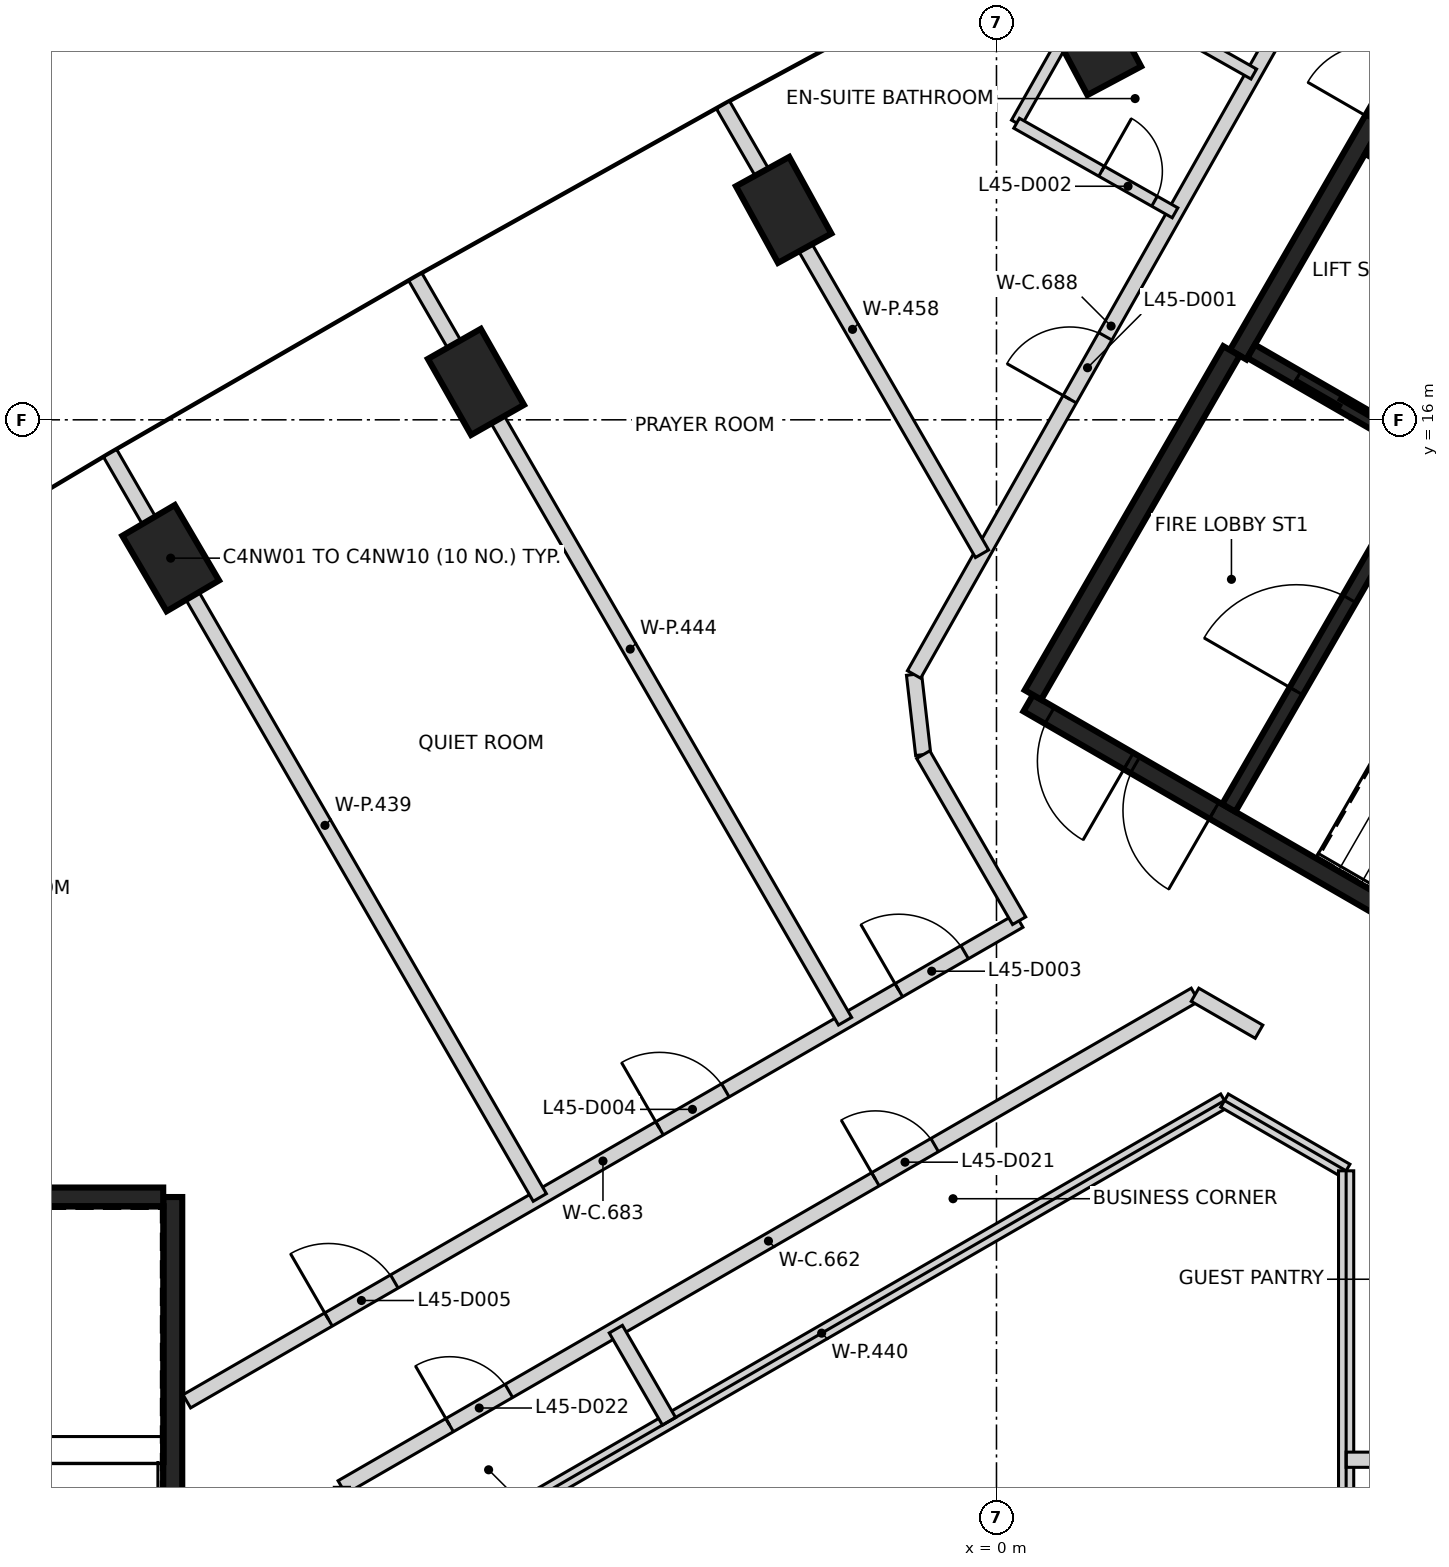
"""IFC4 building model, lengths in metres.
Left out: names, types, materials, properties, quantities, classifications, styles, units other than length and angle.
Written with IfcOpenShell. Run it as: python <this file> out.ifc"""

import sys

from ifc_helpers import new_model, si_unit, direction, frame, frame_2d, origin, origin_2d, place, context, subcontext, project, spatial, rectangle, extrude, element, fill, save


model = new_model("IFC4")
c1 = context("Model", 3, precision=1e-05, world=origin(), true_north=direction((0.0, 1.0)))
c2 = subcontext(c1, "Body", "Model", "MODEL_VIEW")
j1 = project(units=[si_unit("LENGTHUNIT", "METRE"), si_unit("PLANEANGLEUNIT", "RADIAN")], contexts=[c1])
p1 = place(None, origin())
s1 = spatial("IfcSite", under=j1, at=p1, CompositionType="ELEMENT")
p2 = place(p1, origin())
s2 = spatial("IfcBuilding", under=s1, at=p2, CompositionType="ELEMENT")
p3 = place(p2, frame((0.0, 0.0, 182.8)))
s3 = spatial("IfcBuildingStorey", under=s2, at=p3, CompositionType="ELEMENT", Elevation=182.8)
for number, where, z_axis, x_axis in (
    (1, (1.279, 20.968, -0.35), (0.0, 0.0, 1.0), (-0.47, 0.883, 0.0)),
    (2, (-2.8, 18.762, -0.35), (0.0, 0.0, 1.0), (-0.482, 0.876, 0.0)),
    (3, (-6.848, 16.499, -0.35), (0.0, 0.0, 1.0), (-0.494, 0.87, 0.0)),
    (4, (-10.864, 14.18, -0.35), (0.0, 0.0, 1.0), (-0.506, 0.862, 0.0)),
):
    element("IfcColumn", number, at=place(p3, frame(where, z_axis=z_axis, x_axis=x_axis)), inside=s3, PredefinedType="COLUMN", context=c2, shape_type="SweptSolid", body=[
        extrude(rectangle(XDim=1.15, YDim=0.8, at=origin_2d()), origin(), (0.0, 0.0, 1.0), 3.6),
    ])
p4 = place(p3, frame((-10.837, 5.775, 0.0), z_axis=(0.0, 0.0, 1.0), x_axis=(0.0, -1.0, 0.0)))
e5 = element("IfcWall", 5, at=p4, inside=s3, PredefinedType="SHEAR", context=c2, shape_type="SweptSolid", body=[
    extrude(rectangle(XDim=11.55, YDim=0.25, at=frame_2d((5.775, 0.0))), origin(), (0.0, 0.0, 1.0), 3.25),
])
p5 = place(p4, frame((10.025, 0.0, 0.0)))
e6 = element("IfcOpeningElement", 6, at=p5, cuts=e5, PredefinedType="OPENING", context=c2, shape_type="SweptSolid", body=[
    extrude(rectangle(XDim=1.2, YDim=2.1, at=frame_2d((0.6, 1.05))), frame((0.0, 0.135, 0.0), z_axis=(0.0, -1.0, 0.0), x_axis=(1.0, 0.0, 0.0)), (0.0, 0.0, 1.0), 0.27),
])
p6 = place(p4, frame((8.725, 0.0, 0.0)))
e7 = element("IfcOpeningElement", 7, at=p6, cuts=e5, PredefinedType="OPENING", context=c2, shape_type="SweptSolid", body=[
    extrude(rectangle(XDim=1.2, YDim=2.1, at=frame_2d((0.6, 1.05))), frame((0.0, 0.135, 0.0), z_axis=(0.0, -1.0, 0.0), x_axis=(1.0, 0.0, 0.0)), (0.0, 0.0, 1.0), 0.27),
])
p7 = place(p3, frame((-16.472, 5.775, 0.0), z_axis=(0.0, 0.0, 1.0), x_axis=(1.0, 0.0, 0.0)))
e8 = element("IfcWall", 8, at=p7, inside=s3, PredefinedType="SHEAR", context=c2, shape_type="SweptSolid", body=[
    extrude(rectangle(XDim=5.51, YDim=0.25, at=frame_2d((2.755, 0.0))), origin(), (0.0, 0.0, 1.0), 3.25),
])
p8 = place(p3, frame((10.42, 6.498, 0.0), z_axis=(0.0, 0.0, 1.0), x_axis=(-0.866021906294, 0.500006057782, 0.0)))
e9 = element("IfcWall", 9, at=p8, inside=s3, PredefinedType="SHEAR", context=c2, shape_type="SweptSolid", body=[
    extrude(rectangle(XDim=11.55, YDim=0.25, at=frame_2d((5.775, 0.0))), origin(), (0.0, 0.0, 1.0), 3.25),
])
p9 = place(p8, frame((10.025, 0.0, 0.0)))
e10 = element("IfcOpeningElement", 10, at=p9, cuts=e9, PredefinedType="OPENING", context=c2, shape_type="SweptSolid", body=[
    extrude(rectangle(XDim=1.2, YDim=2.1, at=frame_2d((0.6, 1.05))), frame((0.0, 0.135, 0.0), z_axis=(0.0, -1.0, 0.0), x_axis=(1.0, 0.0, 0.0)), (0.0, 0.0, 1.0), 0.27),
])
p10 = place(p8, frame((8.725, 0.0, 0.0)))
e11 = element("IfcOpeningElement", 11, at=p10, cuts=e9, PredefinedType="OPENING", context=c2, shape_type="SweptSolid", body=[
    extrude(rectangle(XDim=1.2, YDim=2.1, at=frame_2d((0.6, 1.05))), frame((0.0, 0.135, 0.0), z_axis=(0.0, -1.0, 0.0), x_axis=(1.0, 0.0, 0.0)), (0.0, 0.0, 1.0), 0.27),
])
p11 = place(p3, frame((3.179, 16.856, 0.0), z_axis=(0.0, 0.0, 1.0), x_axis=(0.500001955336, 0.866024274868, 0.0)))
e12 = element("IfcWall", 12, at=p11, inside=s3, PredefinedType="SHEAR", context=c2, shape_type="SweptSolid", body=[
    extrude(rectangle(XDim=6.125, YDim=0.25, at=frame_2d((3.062, 0.0))), origin(), (0.0, 0.0, 1.0), 3.25),
])
p12 = place(p11, frame((3.563, 0.0, 0.0)))
e13 = element("IfcOpeningElement", 13, at=p12, cuts=e12, PredefinedType="OPENING", context=c2, shape_type="SweptSolid", body=[
    extrude(rectangle(XDim=1.0, YDim=2.1, at=frame_2d((0.5, 1.05))), frame((0.0, 0.135, 0.0), z_axis=(0.0, -1.0, 0.0), x_axis=(1.0, 0.0, 0.0)), (0.0, 0.0, 1.0), 0.27),
])
p13 = place(p3, frame((0.48, 12.381, 0.0), z_axis=(0.0, 0.0, 1.0), x_axis=(0.49999885962, 0.866026062182, 0.0)))
e14 = element("IfcWall", 14, at=p13, inside=s3, PredefinedType="SHEAR", context=c2, shape_type="SweptSolid", body=[
    extrude(rectangle(XDim=5.225, YDim=0.25, at=frame_2d((2.612, 0.0))), origin(), (0.0, 0.0, 1.0), 3.25),
])
p14 = place(p3, frame((3.057, 10.895, 0.0), z_axis=(0.0, 0.0, 1.0), x_axis=(0.500027839223, 0.866009330205, 0.0)))
e15 = element("IfcWall", 15, at=p14, inside=s3, PredefinedType="SHEAR", context=c2, shape_type="SweptSolid", body=[
    extrude(rectangle(XDim=5.098, YDim=0.2, at=frame_2d((2.549, 0.0))), origin(), (0.0, 0.0, 1.0), 3.25),
])
p15 = place(p14, frame((1.774, 0.0, 0.0)))
e16 = element("IfcOpeningElement", 16, at=p15, cuts=e15, PredefinedType="OPENING", context=c2, shape_type="SweptSolid", body=[
    extrude(rectangle(XDim=1.4, YDim=2.1, at=frame_2d((0.7, 1.05))), frame((0.0, 0.11, 0.0), z_axis=(0.0, -1.0, 0.0), x_axis=(1.0, 0.0, 0.0)), (0.0, 0.0, 1.0), 0.22),
])
p16 = place(p3, frame((5.646, 15.576, 0.0), z_axis=(0.0, 0.0, 1.0), x_axis=(-0.866018407898, 0.500012117035, 0.0)))
e17 = element("IfcWall", 17, at=p16, inside=s3, PredefinedType="SHEAR", context=c2, shape_type="SweptSolid", body=[
    extrude(rectangle(XDim=2.651, YDim=0.2, at=frame_2d((1.325, 0.0))), origin(), (0.0, 0.0, 1.0), 3.25),
])
p17 = place(p16, frame((0.652, 0.0, 0.0)))
e18 = element("IfcOpeningElement", 18, at=p17, cuts=e17, PredefinedType="OPENING", context=c2, shape_type="SweptSolid", body=[
    extrude(rectangle(XDim=1.3, YDim=2.1, at=frame_2d((0.65, 1.05))), frame((0.0, 0.11, 0.0), z_axis=(0.0, -1.0, 0.0), x_axis=(1.0, 0.0, 0.0)), (0.0, 0.0, 1.0), 0.22),
])
p18 = place(p3, frame((7.196, 18.26, 0.0), z_axis=(0.0, 0.0, 1.0), x_axis=(-0.866018407898, 0.500012117035, 0.0)))
e19 = element("IfcWall", 19, at=p18, inside=s3, PredefinedType="SHEAR", context=c2, shape_type="SweptSolid", body=[
    extrude(rectangle(XDim=2.651, YDim=0.2, at=frame_2d((1.325, 0.0))), origin(), (0.0, 0.0, 1.0), 3.25),
])
p19 = place(p3, frame((-10.652, 3.087, 0.0), z_axis=(0.0, 0.0, 1.0), x_axis=(0.866016136997, 0.500016050204, 0.0)))
e20 = element("IfcWall", 20, at=p19, inside=s3, PredefinedType="PARTITIONING", context=c2, shape_type="SweptSolid", body=[
    extrude(rectangle(XDim=12.645, YDim=0.2, at=frame_2d((6.322, 0.0))), origin(), (0.0, 0.0, 1.0), 3.25),
])
p20 = place(p19, frame((10.817, 0.0, 0.0)))
e21 = element("IfcOpeningElement", 21, at=p20, cuts=e20, PredefinedType="OPENING", context=c2, shape_type="SweptSolid", body=[
    extrude(rectangle(XDim=1.0, YDim=2.1, at=frame_2d((0.5, 1.05))), frame((0.0, 0.11, 0.0), z_axis=(0.0, -1.0, 0.0), x_axis=(1.0, 0.0, 0.0)), (0.0, 0.0, 1.0), 0.22),
])
p21 = place(p19, frame((7.182, 0.0, 0.0)))
e22 = element("IfcOpeningElement", 22, at=p21, cuts=e20, PredefinedType="OPENING", context=c2, shape_type="SweptSolid", body=[
    extrude(rectangle(XDim=1.0, YDim=2.1, at=frame_2d((0.5, 1.05))), frame((0.0, 0.11, 0.0), z_axis=(0.0, -1.0, 0.0), x_axis=(1.0, 0.0, 0.0)), (0.0, 0.0, 1.0), 0.22),
])
p22 = place(p19, frame((2.153, 0.0, 0.0)))
e23 = element("IfcOpeningElement", 23, at=p22, cuts=e20, PredefinedType="OPENING", context=c2, shape_type="SweptSolid", body=[
    extrude(rectangle(XDim=1.0, YDim=2.1, at=frame_2d((0.5, 1.05))), frame((0.0, 0.11, 0.0), z_axis=(0.0, -1.0, 0.0), x_axis=(1.0, 0.0, 0.0)), (0.0, 0.0, 1.0), 0.22),
])
p23 = place(p3, frame((-8.612, 1.956, 0.0), z_axis=(0.0, 0.0, 1.0), x_axis=(0.866034386606, 0.499984440973, 0.0)))
e24 = element("IfcWall", 24, at=p23, inside=s3, PredefinedType="PARTITIONING", context=c2, shape_type="SweptSolid", body=[
    extrude(rectangle(XDim=12.96, YDim=0.2, at=frame_2d((6.48, 0.0))), origin(), (0.0, 0.0, 1.0), 3.25),
])
p24 = place(p23, frame((8.105, 0.0, 0.0)))
e25 = element("IfcOpeningElement", 25, at=p24, cuts=e24, PredefinedType="OPENING", context=c2, shape_type="SweptSolid", body=[
    extrude(rectangle(XDim=0.9, YDim=2.1, at=frame_2d((0.45, 1.05))), frame((0.0, 0.11, 0.0), z_axis=(0.0, -1.0, 0.0), x_axis=(1.0, 0.0, 0.0)), (0.0, 0.0, 1.0), 0.22),
])
p25 = place(p23, frame((1.637, 0.0, 0.0)))
e26 = element("IfcOpeningElement", 26, at=p25, cuts=e24, PredefinedType="OPENING", context=c2, shape_type="SweptSolid", body=[
    extrude(rectangle(XDim=0.9, YDim=2.1, at=frame_2d((0.45, 1.05))), frame((0.0, 0.11, 0.0), z_axis=(0.0, -1.0, 0.0), x_axis=(1.0, 0.0, 0.0)), (0.0, 0.0, 1.0), 0.22),
])
p26 = place(p3, frame((-1.085, 12.65, 0.0), z_axis=(0.0, 0.0, 1.0), x_axis=(0.113812454263, -0.993502252264, 0.0)))
e27 = element("IfcWall", 27, at=p26, inside=s3, PredefinedType="PARTITIONING", context=c2, shape_type="SweptSolid", body=[
    extrude(rectangle(XDim=1.062, YDim=0.2, at=frame_2d((0.531, 0.0))), origin(), (0.0, 0.0, 1.0), 3.25),
])
p27 = place(p3, frame((-1.084, 12.65, 0.0), z_axis=(0.0, 0.0, 1.0), x_axis=(0.492271892014, 0.870441488173, 0.0)))
e28 = element("IfcWall", 28, at=p27, inside=s3, PredefinedType="PARTITIONING", context=c2, shape_type="SweptSolid", body=[
    extrude(rectangle(XDim=10.531, YDim=0.2, at=frame_2d((5.266, 0.0))), origin(), (0.0, 0.0, 1.0), 3.25),
])
p28 = place(p27, frame((4.161, 0.0, 0.0)))
e29 = element("IfcOpeningElement", 29, at=p28, cuts=e28, PredefinedType="OPENING", context=c2, shape_type="SweptSolid", body=[
    extrude(rectangle(XDim=0.95, YDim=2.1, at=frame_2d((0.475, 1.05))), frame((0.0, 0.11, 0.0), z_axis=(0.0, -1.0, 0.0), x_axis=(1.0, 0.0, 0.0)), (0.0, 0.0, 1.0), 0.22),
])
p29 = place(p3, frame((-0.964, 11.595, 0.0), z_axis=(0.0, 0.0, 1.0), x_axis=(0.500197000638, -0.865911635534, 0.0)))
e30 = element("IfcWall", 30, at=p29, inside=s3, PredefinedType="PARTITIONING", context=c2, shape_type="SweptSolid", body=[
    extrude(rectangle(XDim=2.523, YDim=0.2, at=frame_2d((1.262, 0.0))), origin(), (0.0, 0.0, 1.0), 3.25),
])
p30 = place(p3, frame((2.612, 8.436, 0.0), z_axis=(0.0, 0.0, 1.0), x_axis=(0.866055964107, -0.499947064232, 0.0)))
e31 = element("IfcWall", 31, at=p30, inside=s3, PredefinedType="PARTITIONING", context=c2, shape_type="SweptSolid", body=[
    extrude(rectangle(XDim=0.972, YDim=0.2, at=frame_2d((0.486, 0.0))), origin(), (0.0, 0.0, 1.0), 3.25),
])
p31 = place(p3, frame((-11.661, 15.561, 0.0), z_axis=(0.0, 0.0, 1.0), x_axis=(0.500012795616, -0.866018016106, 0.0)))
e32 = element("IfcWall", 32, at=p31, inside=s3, PredefinedType="PARTITIONING", context=c2, shape_type="SweptSolid", body=[
    extrude(rectangle(XDim=11.306, YDim=0.2, at=frame_2d((5.653, 0.0))), origin(), (0.0, 0.0, 1.0), 3.25),
])
p32 = place(p3, frame((-7.6, 0.924, 0.0), z_axis=(0.0, 0.0, 1.0), x_axis=(0.866028806638, 0.499994106039, 0.0)))
e33 = element("IfcWall", 33, at=p32, inside=s3, PredefinedType="PARTITIONING", context=c2, shape_type="SweptSolid", body=[
    extrude(rectangle(XDim=12.24, YDim=0.2, at=frame_2d((6.12, 0.0))), origin(), (0.0, 0.0, 1.0), 3.25),
])
p33 = place(p3, frame((-7.646, 17.879, 0.0), z_axis=(0.0, 0.0, 1.0), x_axis=(0.500047691386, -0.865997867399, 0.0)))
e34 = element("IfcWall", 34, at=p33, inside=s3, PredefinedType="PARTITIONING", context=c2, shape_type="SweptSolid", body=[
    extrude(rectangle(XDim=11.306, YDim=0.2, at=frame_2d((5.653, 0.0))), origin(), (0.0, 0.0, 1.0), 3.25),
])
p34 = place(p3, frame((-5.008, 4.037, 0.0), z_axis=(0.0, 0.0, 1.0), x_axis=(0.49996389635, -0.866046247233, 0.0)))
e35 = element("IfcWall", 35, at=p34, inside=s3, PredefinedType="PARTITIONING", context=c2, shape_type="SweptSolid", body=[
    extrude(rectangle(XDim=1.4, YDim=0.2, at=frame_2d((0.7, 0.0))), origin(), (0.0, 0.0, 1.0), 3.25),
])
p35 = place(p3, frame((-3.597, 20.142, 0.0), z_axis=(0.0, 0.0, 1.0), x_axis=(0.499864035625, -0.866103888623, 0.0)))
e36 = element("IfcWall", 36, at=p35, inside=s3, PredefinedType="PARTITIONING", context=c2, shape_type="SweptSolid", body=[
    extrude(rectangle(XDim=6.817, YDim=0.2, at=frame_2d((3.408, 0.0))), origin(), (0.0, 0.0, 1.0), 3.25),
])
p36 = place(p3, frame((3.0, 7.044, 0.0), z_axis=(0.0, 0.0, 1.0), x_axis=(0.865875248522, -0.500259986404, 0.0)))
e37 = element("IfcWall", 37, at=p36, inside=s3, PredefinedType="PARTITIONING", context=c2, shape_type="SweptSolid", body=[
    extrude(rectangle(XDim=1.848, YDim=0.2, at=frame_2d((0.924, 0.0))), origin(), (0.0, 0.0, 1.0), 3.25),
])
p37 = place(p3, frame((4.6, -6.12, 0.0), z_axis=(0.0, 0.0, 1.0), x_axis=(0.0, 1.0, 0.0)))
e38 = element("IfcWall", 38, at=p37, inside=s3, PredefinedType="PARTITIONING", context=c2, shape_type="SweptSolid", body=[
    extrude(rectangle(XDim=12.24, YDim=0.2, at=frame_2d((6.12, 0.0))), origin(), (0.0, 0.0, 1.0), 3.25),
])
p38 = place(p3, frame((4.6, 2.319, 0.0), z_axis=(0.0, 0.0, 1.0), x_axis=(1.0, 0.0, 0.0)))
e39 = element("IfcWall", 39, at=p38, inside=s3, PredefinedType="PARTITIONING", context=c2, shape_type="SweptSolid", body=[
    extrude(rectangle(XDim=1.4, YDim=0.2, at=frame_2d((0.7, 0.0))), origin(), (0.0, 0.0, 1.0), 3.25),
])
p39 = place(p3, frame((0.263, 19.906, 0.0), z_axis=(0.0, 0.0, 1.0), x_axis=(0.492479898936, 0.870323818555, 0.0)))
e40 = element("IfcWall", 40, at=p39, inside=s3, PredefinedType="PARTITIONING", context=c2, shape_type="SweptSolid", body=[
    extrude(rectangle(XDim=2.094, YDim=0.15, at=frame_2d((1.047, 0.0))), origin(), (0.0, 0.0, 1.0), 2.35),
])
p40 = place(p3, frame((0.265, 19.902, 0.0), z_axis=(0.0, 0.0, 1.0), x_axis=(0.870355792391, -0.492423389627, 0.0)))
e41 = element("IfcWall", 41, at=p40, inside=s3, PredefinedType="PARTITIONING", context=c2, shape_type="SweptSolid", body=[
    extrude(rectangle(XDim=2.395, YDim=0.15, at=frame_2d((1.197, 0.0))), origin(), (0.0, 0.0, 1.0), 3.25),
])
p41 = place(p40, frame((1.284, 0.0, 0.0)))
e42 = element("IfcOpeningElement", 42, at=p41, cuts=e41, PredefinedType="OPENING", context=c2, shape_type="SweptSolid", body=[
    extrude(rectangle(XDim=0.8, YDim=2.1, at=frame_2d((0.4, 1.05))), frame((0.0, 0.085, 0.0), z_axis=(0.0, -1.0, 0.0), x_axis=(1.0, 0.0, 0.0)), (0.0, 0.0, 1.0), 0.17),
])
p42 = place(p3, frame((1.298, 21.73, 0.0), z_axis=(0.0, 0.0, 1.0), x_axis=(0.870321906411, -0.492483278113, 0.0)))
e43 = element("IfcWall", 43, at=p42, inside=s3, PredefinedType="PARTITIONING", context=c2, shape_type="SweptSolid", body=[
    extrude(rectangle(XDim=2.398, YDim=0.15, at=frame_2d((1.199, 0.0))), origin(), (0.0, 0.0, 1.0), 2.35),
])
p43 = place(p17, origin())
e44 = element("IfcDoor", 44, at=p43, inside=s3, OperationType="SLIDING_TO_RIGHT", PredefinedType="DOOR", context=c2, shape_type="SweptSolid", body=[
    extrude(rectangle(XDim=1.3, YDim=2.1, at=frame_2d((0.65, 1.05))), frame((0.0, 0.025, 0.0), z_axis=(0.0, -1.0, 0.0), x_axis=(1.0, 0.0, 0.0)), (0.0, 0.0, 1.0), 0.05),
])
fill(e18, e44)
p44 = place(p9, origin())
e45 = element("IfcDoor", 45, at=p44, inside=s3, OperationType="SINGLE_SWING_LEFT", PredefinedType="DOOR", context=c2, shape_type="SweptSolid", body=[
    extrude(rectangle(XDim=1.2, YDim=2.1, at=frame_2d((0.6, 1.05))), frame((0.0, 0.025, 0.0), z_axis=(0.0, -1.0, 0.0), x_axis=(1.0, 0.0, 0.0)), (0.0, 0.0, 1.0), 0.05),
])
fill(e10, e45)
p45 = place(p10, origin())
e46 = element("IfcDoor", 46, at=p45, inside=s3, OperationType="SINGLE_SWING_RIGHT", PredefinedType="DOOR", context=c2, shape_type="SweptSolid", body=[
    extrude(rectangle(XDim=1.2, YDim=2.1, at=frame_2d((0.6, 1.05))), frame((0.0, 0.025, 0.0), z_axis=(0.0, -1.0, 0.0), x_axis=(1.0, 0.0, 0.0)), (0.0, 0.0, 1.0), 0.05),
])
fill(e11, e46)
p46 = place(p15, origin())
e47 = element("IfcDoor", 47, at=p46, inside=s3, OperationType="SINGLE_SWING_RIGHT", PredefinedType="DOOR", context=c2, shape_type="SweptSolid", body=[
    extrude(rectangle(XDim=1.4, YDim=2.1, at=frame_2d((0.7, 1.05))), frame((0.0, 0.025, 0.0), z_axis=(0.0, -1.0, 0.0), x_axis=(1.0, 0.0, 0.0)), (0.0, 0.0, 1.0), 0.05),
])
fill(e16, e47)
p47 = place(p28, frame((0.95, 0.0, 0.0), z_axis=(0.0, 0.0, 1.0), x_axis=(-1.0, 0.0, 0.0)))
e48 = element("IfcDoor", 48, at=p47, inside=s3, OperationType="SINGLE_SWING_LEFT", PredefinedType="DOOR", context=c2, shape_type="SweptSolid", body=[
    extrude(rectangle(XDim=0.95, YDim=2.1, at=frame_2d((0.475, 1.05))), frame((0.0, 0.025, 0.0), z_axis=(0.0, -1.0, 0.0), x_axis=(1.0, 0.0, 0.0)), (0.0, 0.0, 1.0), 0.05),
])
fill(e29, e48)
p48 = place(p41, origin())
e49 = element("IfcDoor", 49, at=p48, inside=s3, OperationType="SINGLE_SWING_LEFT", PredefinedType="DOOR", context=c2, shape_type="SweptSolid", body=[
    extrude(rectangle(XDim=0.8, YDim=2.1, at=frame_2d((0.4, 1.05))), frame((0.0, 0.025, 0.0), z_axis=(0.0, -1.0, 0.0), x_axis=(1.0, 0.0, 0.0)), (0.0, 0.0, 1.0), 0.05),
])
fill(e42, e49)
p49 = place(p20, origin())
e50 = element("IfcDoor", 50, at=p49, inside=s3, OperationType="SINGLE_SWING_LEFT", PredefinedType="DOOR", context=c2, shape_type="SweptSolid", body=[
    extrude(rectangle(XDim=1.0, YDim=2.1, at=frame_2d((0.5, 1.05))), frame((0.0, 0.025, 0.0), z_axis=(0.0, -1.0, 0.0), x_axis=(1.0, 0.0, 0.0)), (0.0, 0.0, 1.0), 0.05),
])
fill(e21, e50)
p50 = place(p21, origin())
e51 = element("IfcDoor", 51, at=p50, inside=s3, OperationType="SINGLE_SWING_LEFT", PredefinedType="DOOR", context=c2, shape_type="SweptSolid", body=[
    extrude(rectangle(XDim=1.0, YDim=2.1, at=frame_2d((0.5, 1.05))), frame((0.0, 0.025, 0.0), z_axis=(0.0, -1.0, 0.0), x_axis=(1.0, 0.0, 0.0)), (0.0, 0.0, 1.0), 0.05),
])
fill(e22, e51)
p51 = place(p22, origin())
e52 = element("IfcDoor", 52, at=p51, inside=s3, OperationType="SINGLE_SWING_LEFT", PredefinedType="DOOR", context=c2, shape_type="SweptSolid", body=[
    extrude(rectangle(XDim=1.0, YDim=2.1, at=frame_2d((0.5, 1.05))), frame((0.0, 0.025, 0.0), z_axis=(0.0, -1.0, 0.0), x_axis=(1.0, 0.0, 0.0)), (0.0, 0.0, 1.0), 0.05),
])
fill(e23, e52)
p52 = place(p24, frame((0.9, 0.0, 0.0), z_axis=(0.0, 0.0, 1.0), x_axis=(-1.0, 0.0, 0.0)))
e53 = element("IfcDoor", 53, at=p52, inside=s3, OperationType="SINGLE_SWING_LEFT", PredefinedType="DOOR", context=c2, shape_type="SweptSolid", body=[
    extrude(rectangle(XDim=0.9, YDim=2.1, at=frame_2d((0.45, 1.05))), frame((0.0, 0.025, 0.0), z_axis=(0.0, -1.0, 0.0), x_axis=(1.0, 0.0, 0.0)), (0.0, 0.0, 1.0), 0.05),
])
fill(e25, e53)
p53 = place(p25, frame((0.9, 0.0, 0.0), z_axis=(0.0, 0.0, 1.0), x_axis=(-1.0, 0.0, 0.0)))
e54 = element("IfcDoor", 54, at=p53, inside=s3, OperationType="SINGLE_SWING_LEFT", PredefinedType="DOOR", context=c2, shape_type="SweptSolid", body=[
    extrude(rectangle(XDim=0.9, YDim=2.1, at=frame_2d((0.45, 1.05))), frame((0.0, 0.025, 0.0), z_axis=(0.0, -1.0, 0.0), x_axis=(1.0, 0.0, 0.0)), (0.0, 0.0, 1.0), 0.05),
])
fill(e26, e54)
save(model, sys.argv[1])
